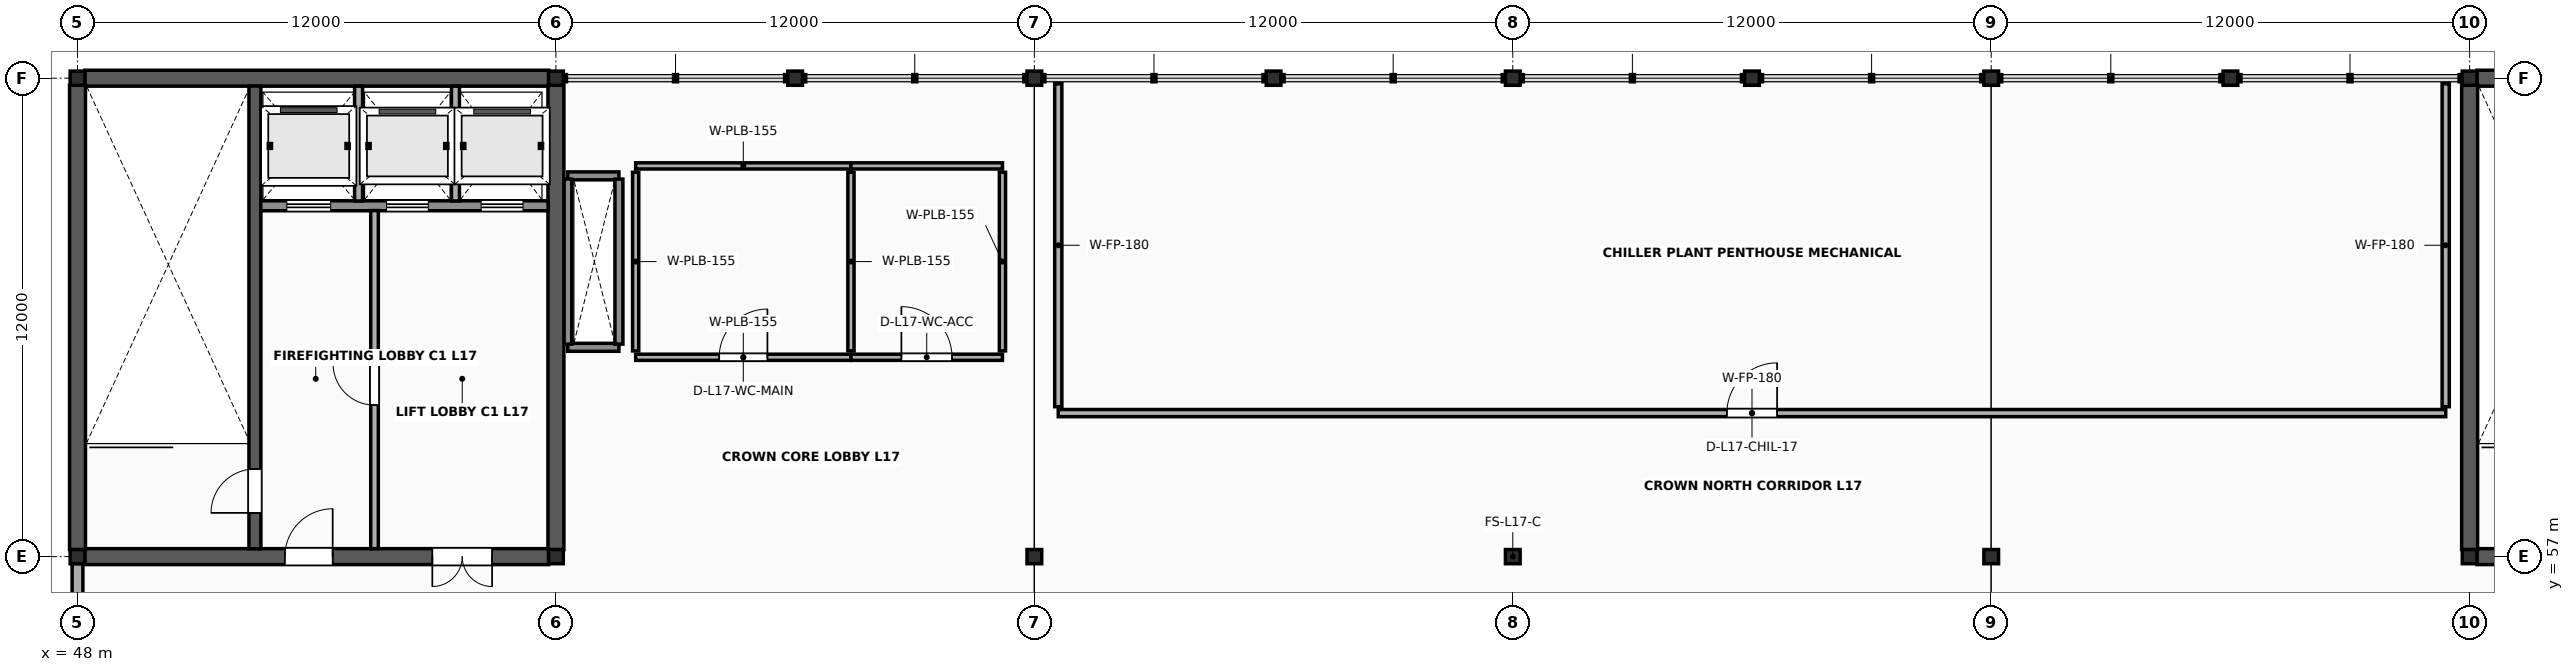
"""IFC4 building model, lengths in metres.
Left out: names, types, materials, properties, quantities, classifications, styles, units other than length and angle.
Written with IfcOpenShell. Run it as: python <this file> out.ifc"""

import sys

from ifc_helpers import new_model, si_unit, direction, frame, frame_2d, origin, origin_2d, place, context, subcontext, project, spatial, rectangle, i_section, extrude, element, fill, save


model = new_model("IFC4")
c1 = context("Model", 3, precision=1e-05, world=origin(), true_north=direction((0.0, 1.0)))
c2 = subcontext(c1, "Body", "Model", "MODEL_VIEW")
j1 = project(units=[si_unit("LENGTHUNIT", "METRE"), si_unit("PLANEANGLEUNIT", "RADIAN")], contexts=[c1])
p1 = place(None, origin())
s1 = spatial("IfcSite", under=j1, at=p1, CompositionType="ELEMENT")
p2 = place(p1, origin())
s2 = spatial("IfcBuilding", under=s1, at=p2, CompositionType="ELEMENT")
p3 = place(p2, frame((0.0, 0.0, 69.6)))
s3 = spatial("IfcBuildingStorey", under=s2, at=p3, CompositionType="ELEMENT", Elevation=69.6)
for number, where, z_axis, x_axis in (
    (1, (48.0, 57.0, 0.0), (0.0, 0.0, 1.0), (1.0, 0.0, 0.0)),
    (2, (48.0, 69.0, 0.0), (0.0, 0.0, 1.0), (1.0, 0.0, 0.0)),
    (3, (60.0, 57.0, 0.0), (0.0, 0.0, 1.0), (1.0, 0.0, 0.0)),
    (4, (60.0, 69.0, 0.0), (0.0, 0.0, 1.0), (1.0, 0.0, 0.0)),
    (5, (72.0, 57.0, 0.0), (0.0, 0.0, 1.0), (1.0, 0.0, 0.0)),
    (6, (72.0, 69.0, 0.0), (0.0, 0.0, 1.0), (1.0, 0.0, 0.0)),
    (7, (84.0, 57.0, 0.0), (0.0, 0.0, 1.0), (1.0, 0.0, 0.0)),
    (8, (84.0, 69.0, 0.0), (0.0, 0.0, 1.0), (1.0, 0.0, 0.0)),
    (9, (96.0, 57.0, 0.0), (0.0, 0.0, 1.0), (1.0, 0.0, 0.0)),
    (10, (96.0, 69.0, 0.0), (0.0, 0.0, 1.0), (1.0, 0.0, 0.0)),
    (11, (108.0, 57.0, 0.0), (0.0, 0.0, 1.0), (1.0, 0.0, 0.0)),
    (12, (108.0, 69.0, 0.0), (0.0, 0.0, 1.0), (1.0, 0.0, 0.0)),
    (13, (66.0, 69.0, 0.0), (0.0, 0.0, 1.0), (1.0, 0.0, 0.0)),
    (14, (78.0, 69.0, 0.0), (0.0, 0.0, 1.0), (1.0, 0.0, 0.0)),
    (15, (90.0, 69.0, 0.0), (0.0, 0.0, 1.0), (1.0, 0.0, 0.0)),
    (16, (102.0, 69.0, 0.0), (0.0, 0.0, 1.0), (1.0, 0.0, 0.0)),
):
    element("IfcColumn", number, at=place(p3, frame(where, z_axis=z_axis, x_axis=x_axis)), inside=s3, PredefinedType="COLUMN", context=c2, shape_type="SweptSolid", body=[
        extrude(i_section(OverallWidth=0.369, OverallDepth=0.356, WebThickness=0.011, FlangeThickness=0.018, FilletRadius=0.018, at=origin_2d()), origin(), (0.0, 0.0, 1.0), 4.6),
    ])
for number, where, z_axis, x_axis in (
    (17, (60.297, 62.25, 0.0), (0.0, 0.0, 1.0), (1.0, 0.0, 0.0)),
    (18, (60.297, 66.55, 0.0), (0.0, 0.0, 1.0), (1.0, 0.0, 0.0)),
):
    element("IfcWall", number, at=place(p3, frame(where, z_axis=z_axis, x_axis=x_axis)), inside=s3, PredefinedType="SOLIDWALL", context=c2, shape_type="SweptSolid", body=[
        extrude(rectangle(XDim=1.283, YDim=0.2, at=frame_2d((0.642, 0.0))), origin(), (0.0, 0.0, 1.0), 4.383),
    ])
for number, where, z_axis, x_axis in (
    (19, (60.297, 62.33, 0.0), (0.0, 0.0, 1.0), (0.0, 1.0, 0.0)),
    (20, (61.58, 62.33, 0.0), (0.0, 0.0, 1.0), (0.0, 1.0, 0.0)),
):
    element("IfcWall", number, at=place(p3, frame(where, z_axis=z_axis, x_axis=x_axis)), inside=s3, PredefinedType="SOLIDWALL", context=c2, shape_type="SweptSolid", body=[
        extrude(rectangle(XDim=4.14, YDim=0.2, at=frame_2d((2.07, 0.0))), origin(), (0.0, 0.0, 1.0), 4.383),
    ])
p4 = place(p3, frame((48.181, 57.0, 0.0), z_axis=(0.0, 0.0, 1.0), x_axis=(1.0, 0.0, 0.0)))
e21 = element("IfcWall", 21, at=p4, inside=s3, PredefinedType="SHEAR", context=c2, shape_type="SweptSolid", body=[
    extrude(rectangle(XDim=11.637, YDim=0.4, at=frame_2d((5.819, 0.0))), origin(), (0.0, 0.0, 1.0), 4.383),
])
p5 = place(p4, frame((5.019, 0.0, 0.0)))
e22 = element("IfcOpeningElement", 22, at=p5, cuts=e21, PredefinedType="OPENING", context=c2, shape_type="SweptSolid", body=[
    extrude(rectangle(XDim=1.2, YDim=2.2, at=frame_2d((0.6, 1.1))), frame((0.0, 0.215, 0.0), z_axis=(0.0, -1.0, 0.0), x_axis=(1.0, 0.0, 0.0)), (0.0, 0.0, 1.0), 0.43),
])
p6 = place(p4, frame((8.718, 0.0, 0.0)))
e23 = element("IfcOpeningElement", 23, at=p6, cuts=e21, PredefinedType="OPENING", context=c2, shape_type="SweptSolid", body=[
    extrude(rectangle(XDim=1.5, YDim=2.25, at=frame_2d((0.75, 1.125))), frame((0.0, 0.215, 0.0), z_axis=(0.0, -1.0, 0.0), x_axis=(1.0, 0.0, 0.0)), (0.0, 0.0, 1.0), 0.43),
])
p7 = place(p3, frame((48.181, 69.0, 0.0), z_axis=(0.0, 0.0, 1.0), x_axis=(1.0, 0.0, 0.0)))
e24 = element("IfcWall", 24, at=p7, inside=s3, PredefinedType="SHEAR", context=c2, shape_type="SweptSolid", body=[
    extrude(rectangle(XDim=11.637, YDim=0.4, at=frame_2d((5.819, 0.0))), origin(), (0.0, 0.0, 1.0), 4.383),
])
for number, where, z_axis, x_axis in (
    (25, (48.0, 57.175, 0.0), (0.0, 0.0, 1.0), (0.0, 1.0, 0.0)),
    (26, (60.0, 57.175, 0.0), (0.0, 0.0, 1.0), (0.0, 1.0, 0.0)),
):
    element("IfcWall", number, at=place(p3, frame(where, z_axis=z_axis, x_axis=x_axis)), inside=s3, PredefinedType="SHEAR", context=c2, shape_type="SweptSolid", body=[
        extrude(rectangle(XDim=11.65, YDim=0.4, at=frame_2d((5.825, 0.0))), origin(), (0.0, 0.0, 1.0), 4.383),
    ])
p8 = place(p3, frame((52.45, 57.197, 0.0), z_axis=(0.0, 0.0, 1.0), x_axis=(0.0, 1.0, 0.0)))
e27 = element("IfcWall", 27, at=p8, inside=s3, PredefinedType="SHEAR", context=c2, shape_type="SweptSolid", body=[
    extrude(rectangle(XDim=11.606, YDim=0.3, at=frame_2d((5.803, 0.0))), origin(), (0.0, 0.0, 1.0), 4.383),
])
p9 = place(p8, frame((0.9, 0.0, 0.0)))
e28 = element("IfcOpeningElement", 28, at=p9, cuts=e27, PredefinedType="OPENING", context=c2, shape_type="SweptSolid", body=[
    extrude(rectangle(XDim=1.1, YDim=2.2, at=frame_2d((0.55, 1.1))), frame((0.0, 0.165, 0.0), z_axis=(0.0, -1.0, 0.0), x_axis=(1.0, 0.0, 0.0)), (0.0, 0.0, 1.0), 0.33),
])
p10 = place(p3, frame((52.597, 65.8, 0.0), z_axis=(0.0, 0.0, 1.0), x_axis=(1.0, 0.0, 0.0)))
e29 = element("IfcWall", 29, at=p10, inside=s3, PredefinedType="SOLIDWALL", context=c2, shape_type="SweptSolid", body=[
    extrude(rectangle(XDim=7.206, YDim=0.25, at=frame_2d((3.603, 0.0))), origin(), (0.0, 0.0, 1.0), 4.383),
])
p11 = place(p10, frame((0.653, 0.0, 0.0)))
e30 = element("IfcOpeningElement", 30, at=p11, cuts=e29, PredefinedType="OPENING", context=c2, shape_type="SweptSolid", body=[
    extrude(rectangle(XDim=1.1, YDim=2.24, at=frame_2d((0.55, 1.12))), frame((0.0, 0.14, 0.0), z_axis=(0.0, -1.0, 0.0), x_axis=(1.0, 0.0, 0.0)), (0.0, 0.0, 1.0), 0.28),
])
p12 = place(p10, frame((3.153, 0.0, 0.0)))
e31 = element("IfcOpeningElement", 31, at=p12, cuts=e29, PredefinedType="OPENING", context=c2, shape_type="SweptSolid", body=[
    extrude(rectangle(XDim=1.05, YDim=2.2, at=frame_2d((0.525, 1.1))), frame((0.0, 0.14, 0.0), z_axis=(0.0, -1.0, 0.0), x_axis=(1.0, 0.0, 0.0)), (0.0, 0.0, 1.0), 0.28),
])
p13 = place(p10, frame((5.528, 0.0, 0.0)))
e32 = element("IfcOpeningElement", 32, at=p13, cuts=e29, PredefinedType="OPENING", context=c2, shape_type="SweptSolid", body=[
    extrude(rectangle(XDim=1.05, YDim=2.2, at=frame_2d((0.525, 1.1))), frame((0.0, 0.14, 0.0), z_axis=(0.0, -1.0, 0.0), x_axis=(1.0, 0.0, 0.0)), (0.0, 0.0, 1.0), 0.28),
])
for number, where, z_axis, x_axis in (
    (33, (55.05, 65.92, 0.0), (0.0, 0.0, 1.0), (0.0, 1.0, 0.0)),
    (34, (57.48, 65.92, 0.0), (0.0, 0.0, 1.0), (0.0, 1.0, 0.0)),
):
    element("IfcWall", number, at=place(p3, frame(where, z_axis=z_axis, x_axis=x_axis)), inside=s3, PredefinedType="SOLIDWALL", context=c2, shape_type="SweptSolid", body=[
        extrude(rectangle(XDim=2.88, YDim=0.2, at=frame_2d((1.44, 0.0))), origin(), (0.0, 0.0, 1.0), 4.373),
    ])
p14 = place(p3, frame((55.45, 57.2, 0.0), z_axis=(0.0, 0.0, 1.0), x_axis=(0.0, 1.0, 0.0)))
e35 = element("IfcWall", 35, at=p14, inside=s3, PredefinedType="SOLIDWALL", context=c2, shape_type="SweptSolid", body=[
    extrude(rectangle(XDim=8.48, YDim=0.19, at=frame_2d((4.24, 0.0))), origin(), (0.0, 0.0, 1.0), 4.373),
])
p15 = place(p14, frame((3.6, 0.0, 0.0)))
e36 = element("IfcOpeningElement", 36, at=p15, cuts=e35, PredefinedType="OPENING", context=c2, shape_type="SweptSolid", body=[
    extrude(rectangle(XDim=1.04, YDim=2.18, at=frame_2d((0.52, 1.09))), frame((0.0, 0.11, 0.0), z_axis=(0.0, -1.0, 0.0), x_axis=(1.0, 0.0, 0.0)), (0.0, 0.0, 1.0), 0.22),
])
p16 = place(p3, frame((108.181, 57.0, 0.0), z_axis=(0.0, 0.0, 1.0), x_axis=(1.0, 0.0, 0.0)))
e37 = element("IfcWall", 37, at=p16, inside=s3, PredefinedType="SHEAR", context=c2, shape_type="SweptSolid", body=[
    extrude(rectangle(XDim=11.637, YDim=0.4, at=frame_2d((5.819, 0.0))), origin(), (0.0, 0.0, 1.0), 4.383),
])
p17 = place(p16, frame((5.019, 0.0, 0.0)))
e38 = element("IfcOpeningElement", 38, at=p17, cuts=e37, PredefinedType="OPENING", context=c2, shape_type="SweptSolid", body=[
    extrude(rectangle(XDim=1.2, YDim=2.2, at=frame_2d((0.6, 1.1))), frame((0.0, 0.215, 0.0), z_axis=(0.0, -1.0, 0.0), x_axis=(1.0, 0.0, 0.0)), (0.0, 0.0, 1.0), 0.43),
])
p18 = place(p16, frame((8.719, 0.0, 0.0)))
e39 = element("IfcOpeningElement", 39, at=p18, cuts=e37, PredefinedType="OPENING", context=c2, shape_type="SweptSolid", body=[
    extrude(rectangle(XDim=1.5, YDim=2.25, at=frame_2d((0.75, 1.125))), frame((0.0, 0.215, 0.0), z_axis=(0.0, -1.0, 0.0), x_axis=(1.0, 0.0, 0.0)), (0.0, 0.0, 1.0), 0.43),
])
p19 = place(p3, frame((108.181, 69.0, 0.0), z_axis=(0.0, 0.0, 1.0), x_axis=(1.0, 0.0, 0.0)))
e40 = element("IfcWall", 40, at=p19, inside=s3, PredefinedType="SHEAR", context=c2, shape_type="SweptSolid", body=[
    extrude(rectangle(XDim=11.637, YDim=0.4, at=frame_2d((5.819, 0.0))), origin(), (0.0, 0.0, 1.0), 4.383),
])
p20 = place(p3, frame((108.0, 57.175, 0.0), z_axis=(0.0, 0.0, 1.0), x_axis=(0.0, 1.0, 0.0)))
e41 = element("IfcWall", 41, at=p20, inside=s3, PredefinedType="SHEAR", context=c2, shape_type="SweptSolid", body=[
    extrude(rectangle(XDim=11.65, YDim=0.4, at=frame_2d((5.825, 0.0))), origin(), (0.0, 0.0, 1.0), 4.383),
])
p21 = place(p3, frame((48.0, 45.176, 0.0), z_axis=(0.0, 0.0, 1.0), x_axis=(0.0, 1.0, 0.0)))
e42 = element("IfcWall", 42, at=p21, inside=s3, PredefinedType="SOLIDWALL", context=c2, shape_type="SweptSolid", body=[
    extrude(rectangle(XDim=11.648, YDim=0.27, at=frame_2d((5.824, 0.0))), origin(), (0.0, 0.0, 1.0), 3.836),
])
p22 = place(p21, frame((4.549, 0.0, 1.4)))
e43 = element("IfcOpeningElement", 43, at=p22, cuts=e42, PredefinedType="OPENING", context=c2, shape_type="SweptSolid", body=[
    extrude(rectangle(XDim=2.55, YDim=0.88, at=frame_2d((1.275, 0.44))), frame((0.0, 0.15, 0.0), z_axis=(0.0, -1.0, 0.0), x_axis=(1.0, 0.0, 0.0)), (0.0, 0.0, 1.0), 0.3),
])
p23 = place(p3, frame((62.0, 62.0, 0.0), z_axis=(0.0, 0.0, 1.0), x_axis=(1.0, 0.0, 0.0)))
e44 = element("IfcWall", 44, at=p23, inside=s3, PredefinedType="PLUMBINGWALL", context=c2, shape_type="SweptSolid", body=[
    extrude(rectangle(XDim=5.4, YDim=0.155, at=frame_2d((2.7, 0.0))), origin(), (0.0, 0.0, 1.0), 2.88),
])
p24 = place(p23, frame((2.095, 0.0, 0.0)))
e45 = element("IfcOpeningElement", 45, at=p24, cuts=e44, PredefinedType="OPENING", context=c2, shape_type="SweptSolid", body=[
    extrude(rectangle(XDim=1.21, YDim=2.25, at=frame_2d((0.605, 1.125))), frame((0.0, 0.093, 0.0), z_axis=(0.0, -1.0, 0.0), x_axis=(1.0, 0.0, 0.0)), (0.0, 0.0, 1.0), 0.185),
])
p25 = place(p3, frame((62.0, 66.8, 0.0), z_axis=(0.0, 0.0, 1.0), x_axis=(1.0, 0.0, 0.0)))
e46 = element("IfcWall", 46, at=p25, inside=s3, PredefinedType="PLUMBINGWALL", context=c2, shape_type="SweptSolid", body=[
    extrude(rectangle(XDim=5.4, YDim=0.155, at=frame_2d((2.7, 0.0))), origin(), (0.0, 0.0, 1.0), 2.88),
])
for number, where, z_axis, x_axis in (
    (47, (62.0, 62.16, 0.0), (0.0, 0.0, 1.0), (0.0, 1.0, 0.0)),
    (48, (67.4, 62.16, 0.0), (0.0, 0.0, 1.0), (0.0, 1.0, 0.0)),
):
    element("IfcWall", number, at=place(p3, frame(where, z_axis=z_axis, x_axis=x_axis)), inside=s3, PredefinedType="PLUMBINGWALL", context=c2, shape_type="SweptSolid", body=[
        extrude(rectangle(XDim=4.48, YDim=0.155, at=frame_2d((2.24, 0.0))), origin(), (0.0, 0.0, 1.0), 2.88),
    ])
p26 = place(p3, frame((67.4, 62.0, 0.0), z_axis=(0.0, 0.0, 1.0), x_axis=(1.0, 0.0, 0.0)))
e49 = element("IfcWall", 49, at=p26, inside=s3, PredefinedType="PLUMBINGWALL", context=c2, shape_type="SweptSolid", body=[
    extrude(rectangle(XDim=3.8, YDim=0.155, at=frame_2d((1.9, 0.0))), origin(), (0.0, 0.0, 1.0), 2.88),
])
p27 = place(p26, frame((1.265, 0.0, 0.0)))
e50 = element("IfcOpeningElement", 50, at=p27, cuts=e49, PredefinedType="OPENING", context=c2, shape_type="SweptSolid", body=[
    extrude(rectangle(XDim=1.27, YDim=2.27, at=frame_2d((0.635, 1.135))), frame((0.0, 0.093, 0.0), z_axis=(0.0, -1.0, 0.0), x_axis=(1.0, 0.0, 0.0)), (0.0, 0.0, 1.0), 0.185),
])
p28 = place(p3, frame((67.4, 66.8, 0.0), z_axis=(0.0, 0.0, 1.0), x_axis=(1.0, 0.0, 0.0)))
e51 = element("IfcWall", 51, at=p28, inside=s3, PredefinedType="PLUMBINGWALL", context=c2, shape_type="SweptSolid", body=[
    extrude(rectangle(XDim=3.8, YDim=0.155, at=frame_2d((1.9, 0.0))), origin(), (0.0, 0.0, 1.0), 2.88),
])
p29 = place(p3, frame((71.2, 62.16, 0.0), z_axis=(0.0, 0.0, 1.0), x_axis=(0.0, 1.0, 0.0)))
e52 = element("IfcWall", 52, at=p29, inside=s3, PredefinedType="PLUMBINGWALL", context=c2, shape_type="SweptSolid", body=[
    extrude(rectangle(XDim=4.48, YDim=0.155, at=frame_2d((2.24, 0.0))), origin(), (0.0, 0.0, 1.0), 2.88),
])
p30 = place(p3, frame((72.6, 60.6, 0.0), z_axis=(0.0, 0.0, 1.0), x_axis=(1.0, 0.0, 0.0)))
e53 = element("IfcWall", 53, at=p30, inside=s3, PredefinedType="SOLIDWALL", context=c2, shape_type="SweptSolid", body=[
    extrude(rectangle(XDim=34.8, YDim=0.18, at=frame_2d((17.4, 0.0))), origin(), (0.0, 0.0, 1.0), 2.88),
])
p31 = place(p30, frame((16.77, 0.0, 0.0)))
e54 = element("IfcOpeningElement", 54, at=p31, cuts=e53, PredefinedType="OPENING", context=c2, shape_type="SweptSolid", body=[
    extrude(rectangle(XDim=1.26, YDim=2.16, at=frame_2d((0.63, 1.08))), frame((0.0, 0.105, 0.0), z_axis=(0.0, -1.0, 0.0), x_axis=(1.0, 0.0, 0.0)), (0.0, 0.0, 1.0), 0.21),
])
for number, where, z_axis, x_axis in (
    (55, (72.6, 60.76, 0.0), (0.0, 0.0, 1.0), (0.0, 1.0, 0.0)),
    (56, (107.4, 60.76, 0.0), (0.0, 0.0, 1.0), (0.0, 1.0, 0.0)),
):
    element("IfcWall", number, at=place(p3, frame(where, z_axis=z_axis, x_axis=x_axis)), inside=s3, PredefinedType="SOLIDWALL", context=c2, shape_type="SweptSolid", body=[
        extrude(rectangle(XDim=8.1, YDim=0.18, at=frame_2d((4.05, 0.0))), origin(), (0.0, 0.0, 1.0), 2.88),
    ])
p32 = place(p9, origin())
e57 = element("IfcDoor", 57, at=p32, inside=s3, OperationType="SINGLE_SWING_LEFT", PredefinedType="DOOR", context=c2, shape_type="SweptSolid", body=[
    extrude(rectangle(XDim=1.1, YDim=2.2, at=frame_2d((0.55, 1.1))), frame((0.0, 0.025, 0.0), z_axis=(0.0, -1.0, 0.0), x_axis=(1.0, 0.0, 0.0)), (0.0, 0.0, 1.0), 0.05),
])
fill(e28, e57)
p33 = place(p15, origin())
e58 = element("IfcDoor", 58, at=p33, inside=s3, OperationType="SINGLE_SWING_RIGHT", PredefinedType="DOOR", context=c2, shape_type="SweptSolid", body=[
    extrude(rectangle(XDim=1.04, YDim=2.18, at=frame_2d((0.52, 1.09))), frame((0.0, 0.025, 0.0), z_axis=(0.0, -1.0, 0.0), x_axis=(1.0, 0.0, 0.0)), (0.0, 0.0, 1.0), 0.05),
])
fill(e36, e58)
p34 = place(p5, origin())
e59 = element("IfcDoor", 59, at=p34, inside=s3, OperationType="SINGLE_SWING_RIGHT", PredefinedType="DOOR", context=c2, shape_type="SweptSolid", body=[
    extrude(rectangle(XDim=1.2, YDim=2.2, at=frame_2d((0.6, 1.1))), frame((0.0, 0.025, 0.0), z_axis=(0.0, -1.0, 0.0), x_axis=(1.0, 0.0, 0.0)), (0.0, 0.0, 1.0), 0.05),
])
fill(e22, e59)
p35 = place(p6, origin())
e60 = element("IfcDoor", 60, at=p35, inside=s3, OperationType="DOUBLE_DOOR_SINGLE_SWING", PredefinedType="DOOR", context=c2, shape_type="SweptSolid", body=[
    extrude(rectangle(XDim=1.5, YDim=2.25, at=frame_2d((0.75, 1.125))), frame((0.0, 0.025, 0.0), z_axis=(0.0, -1.0, 0.0), x_axis=(1.0, 0.0, 0.0)), (0.0, 0.0, 1.0), 0.05),
])
fill(e23, e60)
p36 = place(p11, origin())
e61 = element("IfcDoor", 61, at=p36, inside=s3, OperationType="SLIDING_TO_LEFT", PredefinedType="USERDEFINED", context=c2, shape_type="SweptSolid", body=[
    extrude(rectangle(XDim=1.1, YDim=2.24, at=frame_2d((0.55, 1.12))), frame((0.0, 0.025, 0.0), z_axis=(0.0, -1.0, 0.0), x_axis=(1.0, 0.0, 0.0)), (0.0, 0.0, 1.0), 0.05),
])
fill(e30, e61)
p37 = place(p12, origin())
e62 = element("IfcDoor", 62, at=p37, inside=s3, OperationType="SLIDING_TO_LEFT", PredefinedType="USERDEFINED", context=c2, shape_type="SweptSolid", body=[
    extrude(rectangle(XDim=1.05, YDim=2.2, at=frame_2d((0.525, 1.1))), frame((0.0, 0.025, 0.0), z_axis=(0.0, -1.0, 0.0), x_axis=(1.0, 0.0, 0.0)), (0.0, 0.0, 1.0), 0.05),
])
fill(e31, e62)
p38 = place(p13, origin())
e63 = element("IfcDoor", 63, at=p38, inside=s3, OperationType="SLIDING_TO_LEFT", PredefinedType="USERDEFINED", context=c2, shape_type="SweptSolid", body=[
    extrude(rectangle(XDim=1.05, YDim=2.2, at=frame_2d((0.525, 1.1))), frame((0.0, 0.025, 0.0), z_axis=(0.0, -1.0, 0.0), x_axis=(1.0, 0.0, 0.0)), (0.0, 0.0, 1.0), 0.05),
])
fill(e32, e63)
p39 = place(p24, origin())
e64 = element("IfcDoor", 64, at=p39, inside=s3, OperationType="SINGLE_SWING_RIGHT", PredefinedType="DOOR", context=c2, shape_type="SweptSolid", body=[
    extrude(rectangle(XDim=1.21, YDim=2.25, at=frame_2d((0.605, 1.125))), frame((0.0, 0.025, 0.0), z_axis=(0.0, -1.0, 0.0), x_axis=(1.0, 0.0, 0.0)), (0.0, 0.0, 1.0), 0.05),
])
fill(e45, e64)
p40 = place(p27, origin())
e65 = element("IfcDoor", 65, at=p40, inside=s3, OperationType="SINGLE_SWING_LEFT", PredefinedType="DOOR", context=c2, shape_type="SweptSolid", body=[
    extrude(rectangle(XDim=1.27, YDim=2.27, at=frame_2d((0.635, 1.135))), frame((0.0, 0.025, 0.0), z_axis=(0.0, -1.0, 0.0), x_axis=(1.0, 0.0, 0.0)), (0.0, 0.0, 1.0), 0.05),
])
fill(e50, e65)
p41 = place(p31, origin())
e66 = element("IfcDoor", 66, at=p41, inside=s3, OperationType="SINGLE_SWING_RIGHT", PredefinedType="DOOR", context=c2, shape_type="SweptSolid", body=[
    extrude(rectangle(XDim=1.26, YDim=2.16, at=frame_2d((0.63, 1.08))), frame((0.0, 0.025, 0.0), z_axis=(0.0, -1.0, 0.0), x_axis=(1.0, 0.0, 0.0)), (0.0, 0.0, 1.0), 0.05),
])
fill(e54, e66)
save(model, sys.argv[1])
